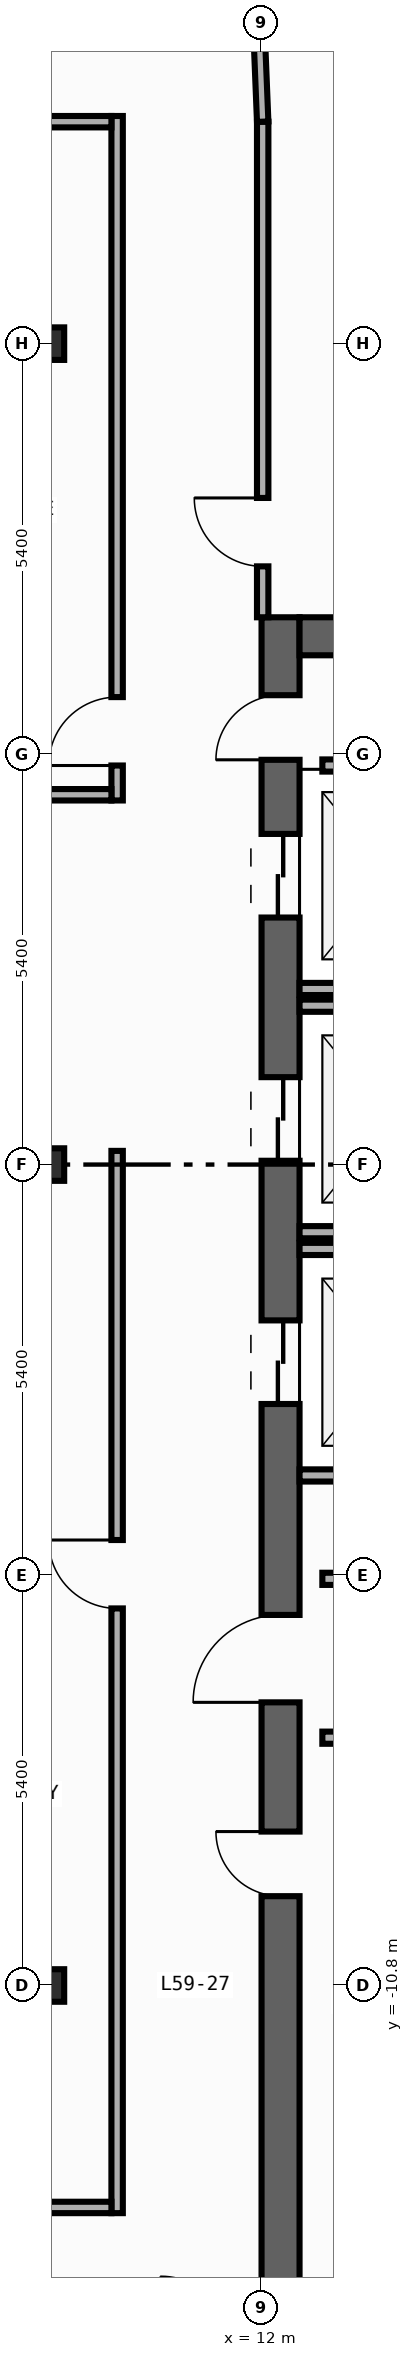
"""IFC4 building model, lengths in metres.
Left out: names, types, materials, properties, quantities, classifications, styles, units other than length and angle.
Written with IfcOpenShell. Run it as: python <this file> out.ifc"""

import sys

from ifc_helpers import new_model, si_unit, direction, frame, frame_2d, origin, origin_2d, place, context, subcontext, project, spatial, rectangle, i_section, extrude, element, fill, save


model = new_model("IFC4")
c1 = context("Model", 3, precision=1e-05, world=origin(), true_north=direction((0.0, 1.0)))
c2 = subcontext(c1, "Body", "Model", "MODEL_VIEW")
j1 = project(units=[si_unit("LENGTHUNIT", "METRE"), si_unit("PLANEANGLEUNIT", "RADIAN")], contexts=[c1])
p1 = place(None, origin())
s1 = spatial("IfcSite", under=j1, at=p1, CompositionType="ELEMENT")
p2 = place(p1, origin())
s2 = spatial("IfcBuilding", under=s1, at=p2, CompositionType="ELEMENT")
p3 = place(p2, frame((0.0, 0.0, 251.2)))
s3 = spatial("IfcBuildingStorey", under=s2, at=p3, CompositionType="ELEMENT", Elevation=251.2)
p4 = place(p3, frame((12.25, -19.8, 0.0), z_axis=(0.0, 0.0, 1.0), x_axis=(0.0, 1.0, 0.0)))
e1 = element("IfcWall", 1, at=p4, inside=s3, PredefinedType="SHEAR", context=c2, shape_type="SweptSolid", body=[
    extrude(rectangle(XDim=27.0, YDim=0.5, at=frame_2d((13.5, 0.0))), origin(), (0.0, 0.0, 1.0), 3.34),
])
p5 = place(p4, frame((23.05, 0.0, 0.0)))
e2 = element("IfcOpeningElement", 2, at=p5, cuts=e1, PredefinedType="OPENING", context=c2, shape_type="SweptSolid", body=[
    extrude(rectangle(XDim=1.1, YDim=2.2, at=frame_2d((0.55, 1.1))), frame((0.0, 0.26, 0.0), z_axis=(0.0, -1.0, 0.0), x_axis=(1.0, 0.0, 0.0)), (0.0, 0.0, 1.0), 0.52),
])
p6 = place(p4, frame((19.85, 0.0, 0.0)))
e3 = element("IfcOpeningElement", 3, at=p6, cuts=e1, PredefinedType="OPENING", context=c2, shape_type="SweptSolid", body=[
    extrude(rectangle(XDim=1.1, YDim=2.2, at=frame_2d((0.55, 1.1))), frame((0.0, 0.26, 0.0), z_axis=(0.0, -1.0, 0.0), x_axis=(1.0, 0.0, 0.0)), (0.0, 0.0, 1.0), 0.52),
])
p7 = place(p4, frame((16.65, 0.0, 0.0)))
e4 = element("IfcOpeningElement", 4, at=p7, cuts=e1, PredefinedType="OPENING", context=c2, shape_type="SweptSolid", body=[
    extrude(rectangle(XDim=1.1, YDim=2.2, at=frame_2d((0.55, 1.1))), frame((0.0, 0.26, 0.0), z_axis=(0.0, -1.0, 0.0), x_axis=(1.0, 0.0, 0.0)), (0.0, 0.0, 1.0), 0.52),
])
p8 = place(p4, frame((10.175, 0.0, 0.0)))
e5 = element("IfcOpeningElement", 5, at=p8, cuts=e1, PredefinedType="OPENING", context=c2, shape_type="SweptSolid", body=[
    extrude(rectangle(XDim=0.85, YDim=2.1, at=frame_2d((0.425, 1.05))), frame((0.0, 0.26, 0.0), z_axis=(0.0, -1.0, 0.0), x_axis=(1.0, 0.0, 0.0)), (0.0, 0.0, 1.0), 0.52),
])
p9 = place(p4, frame((12.725, 0.0, 0.0)))
e6 = element("IfcOpeningElement", 6, at=p9, cuts=e1, PredefinedType="OPENING", context=c2, shape_type="SweptSolid", body=[
    extrude(rectangle(XDim=1.15, YDim=2.2, at=frame_2d((0.575, 1.1))), frame((0.0, 0.26, 0.0), z_axis=(0.0, -1.0, 0.0), x_axis=(1.0, 0.0, 0.0)), (0.0, 0.0, 1.0), 0.52),
])
p10 = place(p4, frame((25.125, 0.0, 0.0)))
e7 = element("IfcOpeningElement", 7, at=p10, cuts=e1, PredefinedType="OPENING", context=c2, shape_type="SweptSolid", body=[
    extrude(rectangle(XDim=0.85, YDim=2.1, at=frame_2d((0.425, 1.05))), frame((0.0, 0.26, 0.0), z_axis=(0.0, -1.0, 0.0), x_axis=(1.0, 0.0, 0.0)), (0.0, 0.0, 1.0), 0.52),
])
p11 = place(p3, frame((12.5, 6.95, 0.0), z_axis=(0.0, 0.0, 1.0), x_axis=(1.0, 0.0, 0.0)))
e8 = element("IfcWall", 8, at=p11, inside=s3, PredefinedType="SHEAR", context=c2, shape_type="SweptSolid", body=[
    extrude(rectangle(XDim=7.4, YDim=0.5, at=frame_2d((3.7, 0.0))), origin(), (0.0, 0.0, 1.0), 3.34),
])
for number, where, z_axis, x_axis in (
    (9, (9.2, -10.8, 0.0), (0.0, 0.0, 1.0), (1.0, 0.0, 0.0)),
    (10, (9.2, 0.0, 0.0), (0.0, 0.0, 1.0), (1.0, 0.0, 0.0)),
    (11, (9.2, 10.8, 0.0), (0.0, 0.0, 1.0), (1.0, 0.0, 0.0)),
):
    element("IfcColumn", number, at=place(p3, frame(where, z_axis=z_axis, x_axis=x_axis)), inside=s3, PredefinedType="COLUMN", context=c2, shape_type="SweptSolid", body=[
        extrude(i_section(OverallWidth=0.407, OverallDepth=0.428, WebThickness=0.02, FlangeThickness=0.035, FilletRadius=0.022, at=origin_2d()), origin(), (0.0, 0.0, 1.0), 3.6),
    ])
for number, where, z_axis, x_axis in (
    (12, (12.5, 2.31, 0.0), (0.0, 0.0, 1.0), (1.0, 0.0, 0.0)),
    (13, (12.5, -0.89, 0.0), (0.0, 0.0, 1.0), (1.0, 0.0, 0.0)),
    (14, (12.5, 2.09, 0.0), (0.0, 0.0, 1.0), (1.0, 0.0, 0.0)),
    (15, (12.5, -4.09, 0.0), (0.0, 0.0, 1.0), (1.0, 0.0, 0.0)),
    (16, (12.5, -1.11, 0.0), (0.0, 0.0, 1.0), (1.0, 0.0, 0.0)),
):
    element("IfcWall", number, at=place(p3, frame(where, z_axis=z_axis, x_axis=x_axis)), inside=s3, PredefinedType="STANDARD", context=c2, shape_type="SweptSolid", body=[
        extrude(rectangle(XDim=2.49, YDim=0.16, at=frame_2d((1.245, 0.0))), origin(), (0.0, 0.0, 1.0), 3.34),
    ])
for number, where, z_axis, x_axis in (
    (17, (12.8, -5.45, 0.0), (0.0, 0.0, 1.0), (1.0, 0.0, 0.0)),
    (18, (12.8, -7.54, 0.0), (0.0, 0.0, 1.0), (1.0, 0.0, 0.0)),
    (19, (12.8, 5.25, 0.0), (0.0, 0.0, 1.0), (1.0, 0.0, 0.0)),
):
    element("IfcWall", number, at=place(p3, frame(where, z_axis=z_axis, x_axis=x_axis)), inside=s3, PredefinedType="STANDARD", context=c2, shape_type="SweptSolid", body=[
        extrude(rectangle(XDim=2.6, YDim=0.16, at=frame_2d((1.3, 0.0))), origin(), (0.0, 0.0, 1.0), 3.34),
    ])
p12 = place(p3, frame((12.015, 7.2, 0.0), z_axis=(0.0, 0.0, 1.0), x_axis=(0.0, 1.0, 0.0)))
e20 = element("IfcWall", 20, at=p12, inside=s3, PredefinedType="PARTITIONING", context=c2, shape_type="SweptSolid", body=[
    extrude(rectangle(XDim=6.52, YDim=0.15, at=frame_2d((3.26, 0.0))), origin(), (0.0, 0.0, 1.0), 3.34),
])
p13 = place(p12, frame((0.67, 0.0, 0.0)))
e21 = element("IfcOpeningElement", 21, at=p13, cuts=e20, PredefinedType="OPENING", context=c2, shape_type="SweptSolid", body=[
    extrude(rectangle(XDim=0.9, YDim=2.15, at=frame_2d((0.45, 1.075))), frame((0.0, 0.085, 0.0), z_axis=(0.0, -1.0, 0.0), x_axis=(1.0, 0.0, 0.0)), (0.0, 0.0, 1.0), 0.17),
])
p14 = place(p3, frame((10.1, 4.79, 0.0), z_axis=(0.0, 0.0, 1.0), x_axis=(0.0, 1.0, 0.0)))
e22 = element("IfcWall", 22, at=p14, inside=s3, PredefinedType="PARTITIONING", context=c2, shape_type="SweptSolid", body=[
    extrude(rectangle(XDim=9.005, YDim=0.15, at=frame_2d((4.502, 0.0))), origin(), (0.0, 0.0, 1.0), 3.34),
])
p15 = place(p14, frame((0.46, 0.0, 0.0)))
e23 = element("IfcOpeningElement", 23, at=p15, cuts=e22, PredefinedType="OPENING", context=c2, shape_type="SweptSolid", body=[
    extrude(rectangle(XDim=0.9, YDim=2.15, at=frame_2d((0.45, 1.075))), frame((0.0, 0.085, 0.0), z_axis=(0.0, -1.0, 0.0), x_axis=(1.0, 0.0, 0.0)), (0.0, 0.0, 1.0), 0.17),
])
p16 = place(p3, frame((10.1, -13.795, 0.0), z_axis=(0.0, 0.0, 1.0), x_axis=(0.0, 1.0, 0.0)))
e24 = element("IfcWall", 24, at=p16, inside=s3, PredefinedType="PARTITIONING", context=c2, shape_type="SweptSolid", body=[
    extrude(rectangle(XDim=13.975, YDim=0.15, at=frame_2d((6.987, 0.0))), origin(), (0.0, 0.0, 1.0), 3.34),
])
p17 = place(p16, frame((7.956, 0.0, 0.0)))
e25 = element("IfcOpeningElement", 25, at=p17, cuts=e24, PredefinedType="OPENING", context=c2, shape_type="SweptSolid", body=[
    extrude(rectangle(XDim=0.9, YDim=2.15, at=frame_2d((0.45, 1.075))), frame((0.0, 0.085, 0.0), z_axis=(0.0, -1.0, 0.0), x_axis=(1.0, 0.0, 0.0)), (0.0, 0.0, 1.0), 0.17),
])
p18 = place(p3, frame((4.97, 4.865, 0.0), z_axis=(0.0, 0.0, 1.0), x_axis=(1.0, 0.0, 0.0)))
e26 = element("IfcWall", 26, at=p18, inside=s3, PredefinedType="PARTITIONING", context=c2, shape_type="SweptSolid", body=[
    extrude(rectangle(XDim=5.055, YDim=0.15, at=frame_2d((2.527, 0.0))), origin(), (0.0, 0.0, 1.0), 3.34),
])
p19 = place(p18, frame((0.46, 0.0, 0.0)))
e27 = element("IfcOpeningElement", 27, at=p19, cuts=e26, PredefinedType="OPENING", context=c2, shape_type="SweptSolid", body=[
    extrude(rectangle(XDim=0.9, YDim=2.15, at=frame_2d((0.45, 1.075))), frame((0.0, 0.085, 0.0), z_axis=(0.0, -1.0, 0.0), x_axis=(1.0, 0.0, 0.0)), (0.0, 0.0, 1.0), 0.17),
])
p20 = place(p3, frame((12.015, 13.72, 0.0), z_axis=(0.0, 0.0, 1.0), x_axis=(-0.040046877756, 0.99919780203, 0.0)))
e28 = element("IfcWall", 28, at=p20, inside=s3, PredefinedType="PARTITIONING", context=c2, shape_type="SweptSolid", body=[
    extrude(rectangle(XDim=1.731, YDim=0.15, at=frame_2d((0.866, 0.0))), origin(), (0.0, 0.0, 1.0), 3.34),
])
p21 = place(p3, frame((4.97, 13.72, 0.0), z_axis=(0.0, 0.0, 1.0), x_axis=(1.0, 0.0, 0.0)))
e29 = element("IfcWall", 29, at=p21, inside=s3, PredefinedType="PARTITIONING", context=c2, shape_type="SweptSolid", body=[
    extrude(rectangle(XDim=5.055, YDim=0.15, at=frame_2d((2.527, 0.0))), origin(), (0.0, 0.0, 1.0), 3.34),
])
p22 = place(p21, frame((0.46, 0.0, 0.0)))
e30 = element("IfcOpeningElement", 30, at=p22, cuts=e29, PredefinedType="OPENING", context=c2, shape_type="SweptSolid", body=[
    extrude(rectangle(XDim=0.9, YDim=2.15, at=frame_2d((0.45, 1.075))), frame((0.0, 0.085, 0.0), z_axis=(0.0, -1.0, 0.0), x_axis=(1.0, 0.0, 0.0)), (0.0, 0.0, 1.0), 0.17),
])
p23 = place(p3, frame((5.14, -13.72, 0.0), z_axis=(0.0, 0.0, 1.0), x_axis=(1.0, 0.0, 0.0)))
e31 = element("IfcWall", 31, at=p23, inside=s3, PredefinedType="PARTITIONING", context=c2, shape_type="SweptSolid", body=[
    extrude(rectangle(XDim=4.885, YDim=0.15, at=frame_2d((2.442, 0.0))), origin(), (0.0, 0.0, 1.0), 3.34),
])
p24 = place(p23, frame((0.46, 0.0, 0.0)))
e32 = element("IfcOpeningElement", 32, at=p24, cuts=e31, PredefinedType="OPENING", context=c2, shape_type="SweptSolid", body=[
    extrude(rectangle(XDim=0.9, YDim=2.15, at=frame_2d((0.45, 1.075))), frame((0.0, 0.085, 0.0), z_axis=(0.0, -1.0, 0.0), x_axis=(1.0, 0.0, 0.0)), (0.0, 0.0, 1.0), 0.17),
])
p25 = place(p5, origin())
e33 = element("IfcDoor", 33, at=p25, inside=s3, OperationType="DOUBLE_DOOR_SLIDING", PredefinedType="DOOR", context=c2, shape_type="SweptSolid", body=[
    extrude(rectangle(XDim=1.1, YDim=2.2, at=frame_2d((0.55, 1.1))), frame((0.0, 0.025, 0.0), z_axis=(0.0, -1.0, 0.0), x_axis=(1.0, 0.0, 0.0)), (0.0, 0.0, 1.0), 0.05),
])
fill(e2, e33)
p26 = place(p6, origin())
e34 = element("IfcDoor", 34, at=p26, inside=s3, OperationType="DOUBLE_DOOR_SLIDING", PredefinedType="DOOR", context=c2, shape_type="SweptSolid", body=[
    extrude(rectangle(XDim=1.1, YDim=2.2, at=frame_2d((0.55, 1.1))), frame((0.0, 0.025, 0.0), z_axis=(0.0, -1.0, 0.0), x_axis=(1.0, 0.0, 0.0)), (0.0, 0.0, 1.0), 0.05),
])
fill(e3, e34)
p27 = place(p7, origin())
e35 = element("IfcDoor", 35, at=p27, inside=s3, OperationType="DOUBLE_DOOR_SLIDING", PredefinedType="DOOR", context=c2, shape_type="SweptSolid", body=[
    extrude(rectangle(XDim=1.1, YDim=2.2, at=frame_2d((0.55, 1.1))), frame((0.0, 0.025, 0.0), z_axis=(0.0, -1.0, 0.0), x_axis=(1.0, 0.0, 0.0)), (0.0, 0.0, 1.0), 0.05),
])
fill(e4, e35)
p28 = place(p8, origin())
e36 = element("IfcDoor", 36, at=p28, inside=s3, OperationType="SINGLE_SWING_RIGHT", PredefinedType="DOOR", context=c2, shape_type="SweptSolid", body=[
    extrude(rectangle(XDim=0.85, YDim=2.1, at=frame_2d((0.425, 1.05))), frame((0.0, 0.025, 0.0), z_axis=(0.0, -1.0, 0.0), x_axis=(1.0, 0.0, 0.0)), (0.0, 0.0, 1.0), 0.05),
])
fill(e5, e36)
p29 = place(p9, origin())
e37 = element("IfcDoor", 37, at=p29, inside=s3, OperationType="SINGLE_SWING_LEFT", PredefinedType="DOOR", context=c2, shape_type="SweptSolid", body=[
    extrude(rectangle(XDim=1.15, YDim=2.2, at=frame_2d((0.575, 1.1))), frame((0.0, 0.025, 0.0), z_axis=(0.0, -1.0, 0.0), x_axis=(1.0, 0.0, 0.0)), (0.0, 0.0, 1.0), 0.05),
])
fill(e6, e37)
p30 = place(p10, origin())
e38 = element("IfcDoor", 38, at=p30, inside=s3, OperationType="SINGLE_SWING_LEFT", PredefinedType="DOOR", context=c2, shape_type="SweptSolid", body=[
    extrude(rectangle(XDim=0.85, YDim=2.1, at=frame_2d((0.425, 1.05))), frame((0.0, 0.025, 0.0), z_axis=(0.0, -1.0, 0.0), x_axis=(1.0, 0.0, 0.0)), (0.0, 0.0, 1.0), 0.05),
])
fill(e7, e38)
p31 = place(p13, origin())
e39 = element("IfcDoor", 39, at=p31, inside=s3, OperationType="SINGLE_SWING_RIGHT", PredefinedType="DOOR", context=c2, shape_type="SweptSolid", body=[
    extrude(rectangle(XDim=0.9, YDim=2.15, at=frame_2d((0.45, 1.075))), frame((0.0, 0.025, 0.0), z_axis=(0.0, -1.0, 0.0), x_axis=(1.0, 0.0, 0.0)), (0.0, 0.0, 1.0), 0.05),
])
fill(e21, e39)
p32 = place(p15, origin())
e40 = element("IfcDoor", 40, at=p32, inside=s3, OperationType="SINGLE_SWING_LEFT", PredefinedType="DOOR", context=c2, shape_type="SweptSolid", body=[
    extrude(rectangle(XDim=0.9, YDim=2.15, at=frame_2d((0.45, 1.075))), frame((0.0, 0.025, 0.0), z_axis=(0.0, -1.0, 0.0), x_axis=(1.0, 0.0, 0.0)), (0.0, 0.0, 1.0), 0.05),
])
fill(e23, e40)
p33 = place(p17, origin())
e41 = element("IfcDoor", 41, at=p33, inside=s3, OperationType="SINGLE_SWING_RIGHT", PredefinedType="DOOR", context=c2, shape_type="SweptSolid", body=[
    extrude(rectangle(XDim=0.9, YDim=2.15, at=frame_2d((0.45, 1.075))), frame((0.0, 0.025, 0.0), z_axis=(0.0, -1.0, 0.0), x_axis=(1.0, 0.0, 0.0)), (0.0, 0.0, 1.0), 0.05),
])
fill(e25, e41)
save(model, sys.argv[1])
